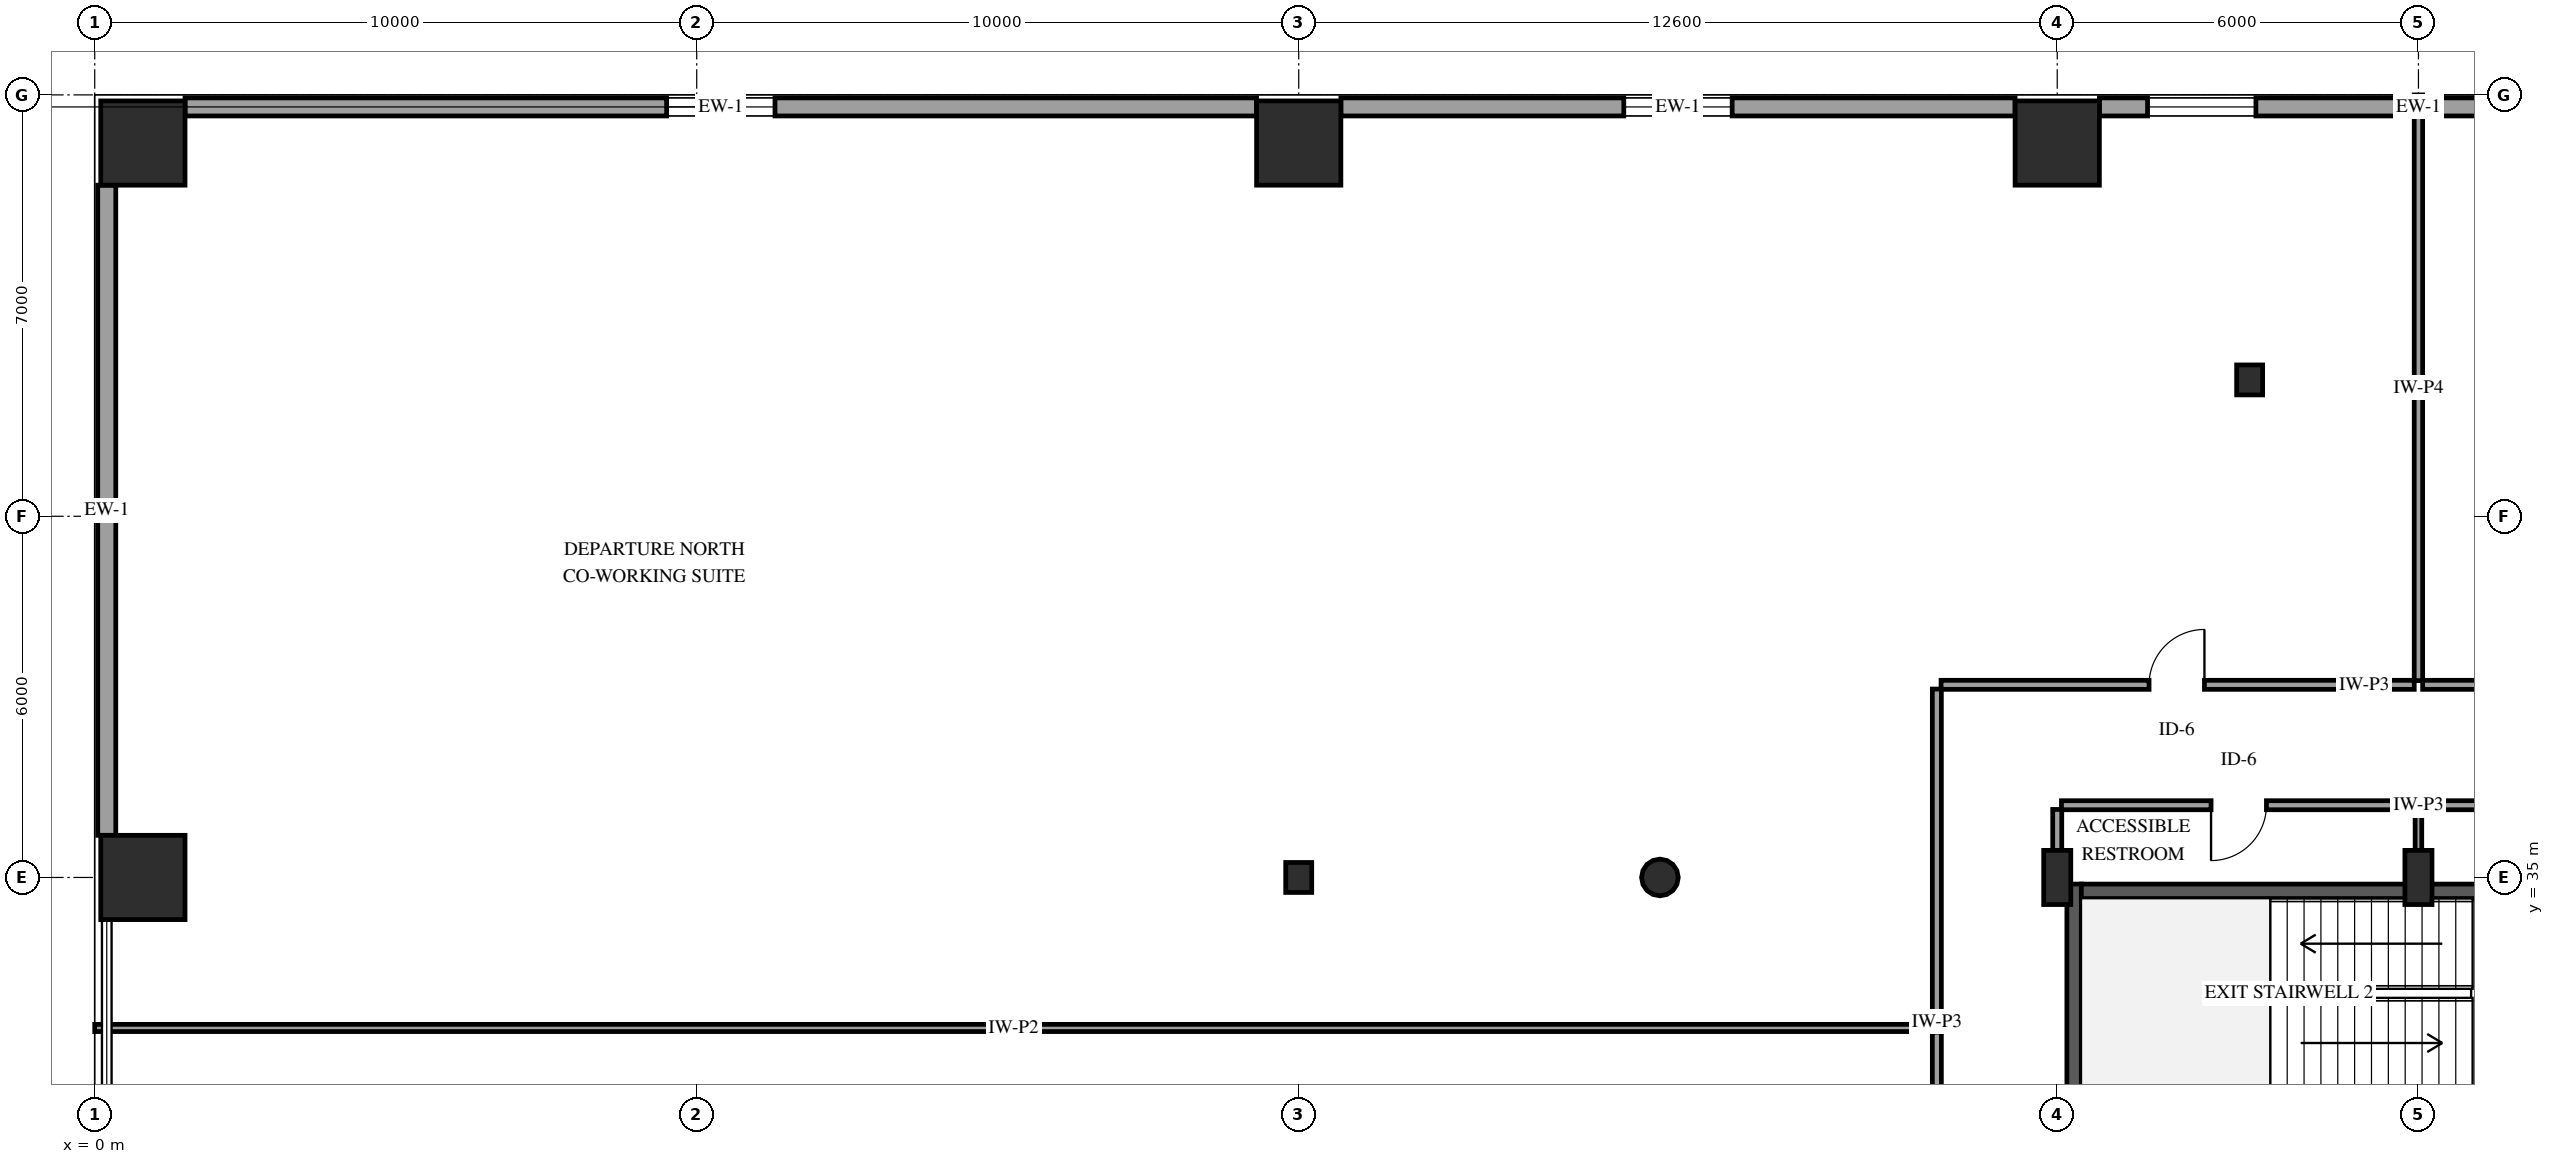
"""IFC4 building model, lengths in metres.
Left out: names, types, materials, properties, quantities, classifications, styles, units other than length and angle.
Written with IfcOpenShell. Run it as: python <this file> out.ifc"""

import sys

from ifc_helpers import new_model, si_unit, direction, frame, frame_2d, origin, origin_2d, place, context, subcontext, project, spatial, rectangle, hollow_circle, i_section, extrude, element, fill, save


model = new_model("IFC4")
c1 = context("Model", 3, precision=1e-05, world=origin(), true_north=direction((0.0, 1.0)))
c2 = subcontext(c1, "Body", "Model", "MODEL_VIEW")
j1 = project(units=[si_unit("LENGTHUNIT", "METRE"), si_unit("PLANEANGLEUNIT", "RADIAN")], contexts=[c1])
p1 = place(None, origin())
s1 = spatial("IfcSite", under=j1, at=p1, CompositionType="ELEMENT")
p2 = place(p1, origin())
s2 = spatial("IfcBuilding", under=s1, at=p2, CompositionType="ELEMENT")
p3 = place(p2, frame((0.0, 0.0, 16.2)))
s3 = spatial("IfcBuildingStorey", under=s2, at=p3, CompositionType="ELEMENT", Elevation=16.2)
p4 = place(p3, frame((32.88, 31.26, 0.0), z_axis=(0.0, 0.0, 1.0), x_axis=(0.0, 1.0, 0.0)))
e1 = element("IfcWall", 1, at=p4, inside=s3, PredefinedType="SHEAR", context=c2, shape_type="SweptSolid", body=[
    extrude(rectangle(XDim=3.63, YDim=0.24, at=frame_2d((1.815, 0.0))), origin(), (0.0, 0.0, 1.0), 4.5),
])
p5 = place(p3, frame((33.0, 34.77, 0.0), z_axis=(0.0, 0.0, 1.0), x_axis=(1.0, 0.0, 0.0)))
e2 = element("IfcWall", 2, at=p5, inside=s3, PredefinedType="SHEAR", context=c2, shape_type="SweptSolid", body=[
    extrude(rectangle(XDim=8.0, YDim=0.24, at=frame_2d((4.0, 0.0))), origin(), (0.0, 0.0, 1.0), 4.5),
])
for number, where, z_axis, x_axis in (
    (3, (32.6, 35.0, 0.0), (0.0, 0.0, 1.0), (1.0, 0.0, 0.0)),
    (4, (38.6, 35.0, 0.0), (0.0, 0.0, 1.0), (1.0, 0.0, 0.0)),
):
    element("IfcColumn", number, at=place(p3, frame(where, z_axis=z_axis, x_axis=x_axis)), inside=s3, PredefinedType="PILASTER", context=c2, shape_type="SweptSolid", body=[
        extrude(rectangle(XDim=0.45, YDim=0.9, at=origin_2d()), origin(), (0.0, 0.0, 1.0), 4.5),
    ])
p6 = place(p3, frame((0.8, 35.0, 0.0), z_axis=(0.0, 0.0, 1.0), x_axis=(1.0, 0.0, 0.0)))
e5 = element("IfcColumn", 5, at=p6, inside=s3, PredefinedType="COLUMN", context=c2, shape_type="SweptSolid", body=[
    extrude(rectangle(XDim=1.4, YDim=1.4, at=origin_2d()), origin(), (0.0, 0.0, 1.0), 4.5),
])
p7 = place(p3, frame((20.0, 35.0, 0.0), z_axis=(0.0, 0.0, 1.0), x_axis=(1.0, 0.0, 0.0)))
e6 = element("IfcColumn", 6, at=p7, inside=s3, PredefinedType="COLUMN", context=c2, shape_type="SweptSolid", body=[
    extrude(i_section(OverallWidth=0.432, OverallDepth=0.498, WebThickness=0.056, FlangeThickness=0.089, FilletRadius=0.038, at=origin_2d()), origin(), (0.0, 0.0, 1.0), 4.5),
])
for number, where, z_axis, x_axis in (
    (7, (0.8, 47.2, 0.0), (0.0, 0.0, 1.0), (1.0, 0.0, 0.0)),
    (8, (20.0, 47.2, 0.0), (0.0, 0.0, 1.0), (1.0, 0.0, 0.0)),
    (9, (32.6, 47.2, 0.0), (0.0, 0.0, 1.0), (1.0, 0.0, 0.0)),
):
    element("IfcColumn", number, at=place(p3, frame(where, z_axis=z_axis, x_axis=x_axis)), inside=s3, PredefinedType="COLUMN", context=c2, shape_type="SweptSolid", body=[
        extrude(rectangle(XDim=1.4, YDim=1.4, at=origin_2d()), origin(), (0.0, 0.0, 1.0), 4.5),
    ])
p8 = place(p3, frame((26.0, 35.0, 0.0), z_axis=(0.0, 0.0, 1.0), x_axis=(1.0, 0.0, 0.0)))
e10 = element("IfcColumn", 10, at=p8, inside=s3, PredefinedType="COLUMN", context=c2, shape_type="SweptSolid", body=[
    extrude(hollow_circle(Radius=0.305, WallThickness=0.022, at=origin_2d()), origin(), (0.0, 0.0, 1.0), 4.5),
])
p9 = place(p3, frame((35.796, 43.265, 0.0), z_axis=(0.0, 0.0, 1.0), x_axis=(1.0, 0.0, 0.0)))
e11 = element("IfcColumn", 11, at=p9, inside=s3, PredefinedType="COLUMN", context=c2, shape_type="SweptSolid", body=[
    extrude(i_section(OverallWidth=0.432, OverallDepth=0.498, WebThickness=0.056, FlangeThickness=0.089, FilletRadius=0.038, at=origin_2d()), origin(), (0.0, 0.0, 1.0), 4.5),
])
p10 = place(p3, frame((1.5, 47.8, 0.0), z_axis=(0.0, 0.0, 1.0), x_axis=(1.0, 0.0, 0.0)))
e12 = element("IfcWall", 12, at=p10, inside=s3, PredefinedType="SOLIDWALL", context=c2, shape_type="SweptSolid", body=[
    extrude(rectangle(XDim=17.8, YDim=0.3, at=frame_2d((8.9, 0.0))), origin(), (0.0, 0.0, 1.0), 3.236),
])
p11 = place(p10, frame((8.0, 0.0, 0.85)))
e13 = element("IfcOpeningElement", 13, at=p11, cuts=e12, PredefinedType="OPENING", context=c2, shape_type="SweptSolid", body=[
    extrude(rectangle(XDim=1.8, YDim=1.75, at=frame_2d((0.9, 0.875))), frame((0.0, 0.16, 0.0), z_axis=(0.0, -1.0, 0.0), x_axis=(1.0, 0.0, 0.0)), (0.0, 0.0, 1.0), 0.32),
])
p12 = place(p3, frame((20.7, 47.8, 0.0), z_axis=(0.0, 0.0, 1.0), x_axis=(1.0, 0.0, 0.0)))
e14 = element("IfcWall", 14, at=p12, inside=s3, PredefinedType="SOLIDWALL", context=c2, shape_type="SweptSolid", body=[
    extrude(rectangle(XDim=11.2, YDim=0.3, at=frame_2d((5.6, 0.0))), origin(), (0.0, 0.0, 1.0), 3.236),
])
p13 = place(p12, frame((4.7, 0.0, 0.85)))
e15 = element("IfcOpeningElement", 15, at=p13, cuts=e14, PredefinedType="OPENING", context=c2, shape_type="SweptSolid", body=[
    extrude(rectangle(XDim=1.8, YDim=1.75, at=frame_2d((0.9, 0.875))), frame((0.0, 0.16, 0.0), z_axis=(0.0, -1.0, 0.0), x_axis=(1.0, 0.0, 0.0)), (0.0, 0.0, 1.0), 0.32),
])
p14 = place(p3, frame((33.3, 47.8, 0.0), z_axis=(0.0, 0.0, 1.0), x_axis=(1.0, 0.0, 0.0)))
e16 = element("IfcWall", 16, at=p14, inside=s3, PredefinedType="SOLIDWALL", context=c2, shape_type="SweptSolid", body=[
    extrude(rectangle(XDim=10.6, YDim=0.3, at=frame_2d((5.3, 0.0))), origin(), (0.0, 0.0, 1.0), 3.236),
])
p15 = place(p14, frame((0.8, 0.0, 0.85)))
e17 = element("IfcOpeningElement", 17, at=p15, cuts=e16, PredefinedType="OPENING", context=c2, shape_type="SweptSolid", body=[
    extrude(rectangle(XDim=1.8, YDim=1.75, at=frame_2d((0.9, 0.875))), frame((0.0, 0.16, 0.0), z_axis=(0.0, -1.0, 0.0), x_axis=(1.0, 0.0, 0.0)), (0.0, 0.0, 1.0), 0.32),
])
p16 = place(p3, frame((0.2, 35.7, 0.0), z_axis=(0.0, 0.0, 1.0), x_axis=(0.0, 1.0, 0.0)))
e18 = element("IfcWall", 18, at=p16, inside=s3, PredefinedType="SOLIDWALL", context=c2, shape_type="SweptSolid", body=[
    extrude(rectangle(XDim=10.8, YDim=0.3, at=frame_2d((5.4, 0.0))), origin(), (0.0, 0.0, 1.0), 3.236),
])
p17 = place(p3, frame((0.0, 32.5, 0.0), z_axis=(0.0, 0.0, 1.0), x_axis=(1.0, 0.0, 0.0)))
e19 = element("IfcWall", 19, at=p17, inside=s3, PredefinedType="PARTITIONING", context=c2, shape_type="SweptSolid", body=[
    extrude(rectangle(XDim=30.53, YDim=0.12, at=frame_2d((15.265, 0.0))), origin(), (0.0, 0.0, 1.0), 4.18),
])
p18 = place(p3, frame((38.6, 38.27, 0.0), z_axis=(0.0, 0.0, 1.0), x_axis=(0.0, 1.0, 0.0)))
e20 = element("IfcWall", 20, at=p18, inside=s3, PredefinedType="PARTITIONING", context=c2, shape_type="SweptSolid", body=[
    extrude(rectangle(XDim=9.73, YDim=0.14, at=frame_2d((4.865, 0.0))), origin(), (0.0, 0.0, 1.0), 4.18),
])
p19 = place(p3, frame((30.67, 38.2, 0.0), z_axis=(0.0, 0.0, 1.0), x_axis=(1.0, 0.0, 0.0)))
e21 = element("IfcWall", 21, at=p19, inside=s3, PredefinedType="PARTITIONING", context=c2, shape_type="SweptSolid", body=[
    extrude(rectangle(XDim=7.86, YDim=0.15, at=frame_2d((3.93, 0.0))), origin(), (0.0, 0.0, 1.0), 4.18),
])
p20 = place(p19, frame((3.455, 0.0, 0.0)))
e22 = element("IfcOpeningElement", 22, at=p20, cuts=e21, PredefinedType="OPENING", context=c2, shape_type="SweptSolid", body=[
    extrude(rectangle(XDim=0.92, YDim=2.12, at=frame_2d((0.46, 1.06))), frame((0.0, 0.085, 0.0), z_axis=(0.0, -1.0, 0.0), x_axis=(1.0, 0.0, 0.0)), (0.0, 0.0, 1.0), 0.17),
])
p21 = place(p3, frame((38.67, 38.2, 0.0), z_axis=(0.0, 0.0, 1.0), x_axis=(1.0, 0.0, 0.0)))
e23 = element("IfcWall", 23, at=p21, inside=s3, PredefinedType="PARTITIONING", context=c2, shape_type="SweptSolid", body=[
    extrude(rectangle(XDim=6.06, YDim=0.15, at=frame_2d((3.03, 0.0))), origin(), (0.0, 0.0, 1.0), 4.18),
])
p22 = place(p3, frame((38.53, 36.2, 0.0), z_axis=(0.0, 0.0, 1.0), x_axis=(-1.0, 0.0, 0.0)))
e24 = element("IfcWall", 24, at=p22, inside=s3, PredefinedType="PARTITIONING", context=c2, shape_type="SweptSolid", body=[
    extrude(rectangle(XDim=5.86, YDim=0.15, at=frame_2d((2.93, 0.0))), origin(), (0.0, 0.0, 1.0), 4.18),
])
p23 = place(p22, frame((2.455, 0.0, 0.0)))
e25 = element("IfcOpeningElement", 25, at=p23, cuts=e24, PredefinedType="OPENING", context=c2, shape_type="SweptSolid", body=[
    extrude(rectangle(XDim=0.92, YDim=2.12, at=frame_2d((0.46, 1.06))), frame((0.0, 0.085, 0.0), z_axis=(0.0, -1.0, 0.0), x_axis=(1.0, 0.0, 0.0)), (0.0, 0.0, 1.0), 0.17),
])
p24 = place(p3, frame((44.53, 36.2, 0.0), z_axis=(0.0, 0.0, 1.0), x_axis=(-1.0, 0.0, 0.0)))
e26 = element("IfcWall", 26, at=p24, inside=s3, PredefinedType="PARTITIONING", context=c2, shape_type="SweptSolid", body=[
    extrude(rectangle(XDim=5.86, YDim=0.15, at=frame_2d((2.93, 0.0))), origin(), (0.0, 0.0, 1.0), 4.18),
])
p25 = place(p24, frame((3.627, 0.0, 0.0)))
e27 = element("IfcOpeningElement", 27, at=p25, cuts=e26, PredefinedType="OPENING", context=c2, shape_type="SweptSolid", body=[
    extrude(rectangle(XDim=0.92, YDim=2.12, at=frame_2d((0.46, 1.06))), frame((0.0, 0.085, 0.0), z_axis=(0.0, -1.0, 0.0), x_axis=(1.0, 0.0, 0.0)), (0.0, 0.0, 1.0), 0.17),
])
p26 = place(p3, frame((30.6, 32.57, 0.0), z_axis=(0.0, 0.0, 1.0), x_axis=(0.0, 1.0, 0.0)))
e28 = element("IfcWall", 28, at=p26, inside=s3, PredefinedType="PARTITIONING", context=c2, shape_type="SweptSolid", body=[
    extrude(rectangle(XDim=5.56, YDim=0.15, at=frame_2d((2.78, 0.0))), origin(), (0.0, 0.0, 1.0), 4.18),
])
p27 = place(p3, frame((30.6, 27.07, 0.0), z_axis=(0.0, 0.0, 1.0), x_axis=(0.0, 1.0, 0.0)))
e29 = element("IfcWall", 29, at=p27, inside=s3, PredefinedType="PARTITIONING", context=c2, shape_type="SweptSolid", body=[
    extrude(rectangle(XDim=5.36, YDim=0.15, at=frame_2d((2.68, 0.0))), origin(), (0.0, 0.0, 1.0), 4.18),
])
p28 = place(p3, frame((32.6, 36.13, 0.0), z_axis=(0.0, 0.0, 1.0), x_axis=(0.0, -1.0, 0.0)))
e30 = element("IfcWall", 30, at=p28, inside=s3, PredefinedType="PARTITIONING", context=c2, shape_type="SweptSolid", body=[
    extrude(rectangle(XDim=1.06, YDim=0.15, at=frame_2d((0.53, 0.0))), origin(), (0.0, 0.0, 1.0), 3.302),
])
p29 = place(p3, frame((38.6, 36.13, 0.0), z_axis=(0.0, 0.0, 1.0), x_axis=(0.0, -1.0, 0.0)))
e31 = element("IfcWall", 31, at=p29, inside=s3, PredefinedType="PARTITIONING", context=c2, shape_type="SweptSolid", body=[
    extrude(rectangle(XDim=1.06, YDim=0.11, at=frame_2d((0.53, 0.0))), origin(), (0.0, 0.0, 1.0), 4.18),
])
p30 = place(p11, origin())
e32 = element("IfcWindow", 32, at=p30, inside=s3, PartitioningType="SINGLE_PANEL", PredefinedType="WINDOW", context=c2, shape_type="SweptSolid", body=[
    extrude(rectangle(XDim=1.8, YDim=1.75, at=frame_2d((0.9, 0.875))), frame((0.0, 0.03, 0.0), z_axis=(0.0, -1.0, 0.0), x_axis=(1.0, 0.0, 0.0)), (0.0, 0.0, 1.0), 0.06),
])
fill(e13, e32)
p31 = place(p13, origin())
e33 = element("IfcWindow", 33, at=p31, inside=s3, PartitioningType="SINGLE_PANEL", PredefinedType="WINDOW", context=c2, shape_type="SweptSolid", body=[
    extrude(rectangle(XDim=1.8, YDim=1.75, at=frame_2d((0.9, 0.875))), frame((0.0, 0.03, 0.0), z_axis=(0.0, -1.0, 0.0), x_axis=(1.0, 0.0, 0.0)), (0.0, 0.0, 1.0), 0.06),
])
fill(e15, e33)
p32 = place(p15, origin())
e34 = element("IfcWindow", 34, at=p32, inside=s3, PartitioningType="SINGLE_PANEL", PredefinedType="WINDOW", context=c2, shape_type="SweptSolid", body=[
    extrude(rectangle(XDim=1.8, YDim=1.75, at=frame_2d((0.9, 0.875))), frame((0.0, 0.03, 0.0), z_axis=(0.0, -1.0, 0.0), x_axis=(1.0, 0.0, 0.0)), (0.0, 0.0, 1.0), 0.06),
])
fill(e17, e34)
p33 = place(p20, origin())
e35 = element("IfcDoor", 35, at=p33, inside=s3, OperationType="SINGLE_SWING_RIGHT", PredefinedType="DOOR", context=c2, shape_type="SweptSolid", body=[
    extrude(rectangle(XDim=0.92, YDim=2.12, at=frame_2d((0.46, 1.06))), frame((0.0, 0.025, 0.0), z_axis=(0.0, -1.0, 0.0), x_axis=(1.0, 0.0, 0.0)), (0.0, 0.0, 1.0), 0.05),
])
fill(e22, e35)
p34 = place(p23, origin())
e36 = element("IfcDoor", 36, at=p34, inside=s3, OperationType="SINGLE_SWING_RIGHT", PredefinedType="DOOR", context=c2, shape_type="SweptSolid", body=[
    extrude(rectangle(XDim=0.92, YDim=2.12, at=frame_2d((0.46, 1.06))), frame((0.0, 0.025, 0.0), z_axis=(0.0, -1.0, 0.0), x_axis=(1.0, 0.0, 0.0)), (0.0, 0.0, 1.0), 0.05),
])
fill(e25, e36)
save(model, sys.argv[1])
